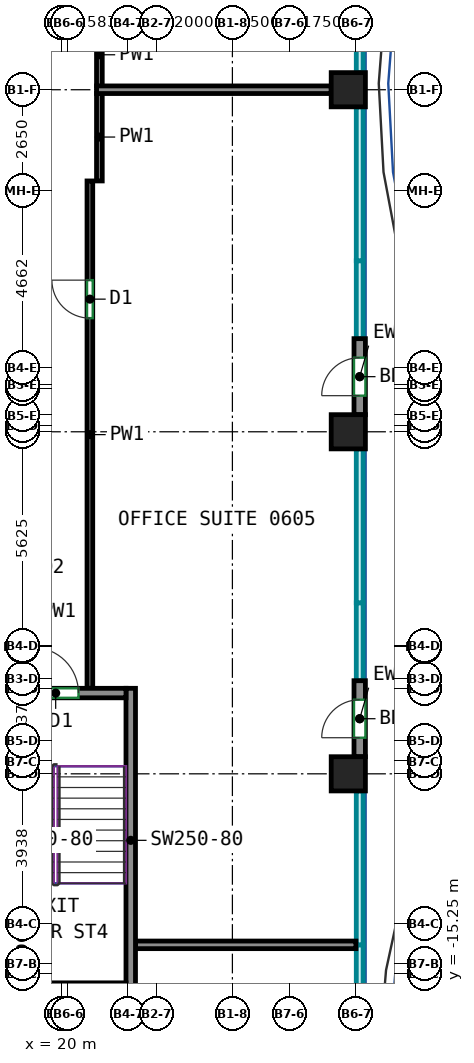
"""IFC4 building model, lengths in metres.
Left out: names, types, materials, properties, quantities, classifications, styles, units other than length and angle.
Written with IfcOpenShell. Run it as: python <this file> out.ifc"""

import sys

from ifc_helpers import new_model, si_unit, direction, frame, frame_2d, origin, origin_2d, place, context, subcontext, project, spatial, rectangle, extrude, source, transform, mapped, element, fill, save


model = new_model("IFC4")
c1 = context("Model", 3, precision=1e-05, world=origin(), true_north=direction((0.0, 1.0)))
c2 = subcontext(c1, "Body", "Model", "MODEL_VIEW")
j1 = project(units=[si_unit("LENGTHUNIT", "METRE"), si_unit("PLANEANGLEUNIT", "RADIAN")], contexts=[c1])
p1 = place(None, origin())
s1 = spatial("IfcSite", under=j1, at=p1, CompositionType="ELEMENT")
p2 = place(p1, origin())
s2 = spatial("IfcBuilding", under=s1, at=p2, CompositionType="ELEMENT")
p3 = place(p2, frame((0.0, 0.0, 31.0)))
s3 = spatial("IfcBuildingStorey", under=s2, at=p3, CompositionType="ELEMENT", Elevation=31.0)
m1 = source(origin(), c2, "Body", "SweptSolid", [
    extrude(rectangle(XDim=0.9, YDim=0.9, at=origin_2d()), origin(), (0.0, 0.0, 1.0), 3.72),
])
for number, where, z_axis, x_axis in (
    (1, (27.55, -10.0, 0.0), (0.0, 0.0, 1.0), (1.0, 0.0, 0.0)),
    (2, (27.55, -1.0, 0.0), (0.0, 0.0, 1.0), (1.0, 0.0, 0.0)),
    (3, (27.55, 8.0, 0.0), (0.0, 0.0, 1.0), (1.0, 0.0, 0.0)),
):
    element("IfcColumn", number, at=place(p3, frame(where, z_axis=z_axis, x_axis=x_axis)), inside=s3, PredefinedType="COLUMN", context=c2, shape_type="MappedRepresentation", body=[
        mapped(m1, transform((0.0, 0.0, 0.0))),
    ])
m2 = source(origin(), c2, "Body", "SweptSolid", [
    extrude(rectangle(XDim=8.0, YDim=0.25, at=frame_2d((4.0, 0.0))), origin(), (0.0, 0.0, 1.0), 3.72),
])
p4 = place(p3, frame((21.825, -15.75, 0.0), z_axis=(0.0, 0.0, 1.0), x_axis=(0.0, 1.0, 0.0)))
e4 = element("IfcWall", 4, at=p4, inside=s3, PredefinedType="SHEAR", context=c2, shape_type="MappedRepresentation", body=[
    mapped(m2, transform((0.0, 0.0, 0.0))),
])
m3 = source(origin(), c2, "Body", "SweptSolid", [
    extrude(rectangle(XDim=3.7, YDim=0.25, at=frame_2d((1.85, 0.0))), origin(), (0.0, 0.0, 1.0), 3.72),
])
p5 = place(p3, frame((18.0, -7.875, 0.0), z_axis=(0.0, 0.0, 1.0), x_axis=(1.0, 0.0, 0.0)))
e5 = element("IfcWall", 5, at=p5, inside=s3, PredefinedType="SHEAR", context=c2, shape_type="MappedRepresentation", body=[
    mapped(m3, transform((0.0, 0.0, 0.0))),
])
p6 = place(p5, frame((1.25, 0.0, 0.0)))
e6 = element("IfcOpeningElement", 6, at=p6, cuts=e5, PredefinedType="OPENING", context=c2, shape_type="SweptSolid", body=[
    extrude(rectangle(XDim=1.2, YDim=2.1, at=frame_2d((0.6, 1.05))), frame((0.0, 0.135, 0.0), z_axis=(0.0, -1.0, 0.0), x_axis=(1.0, 0.0, 0.0)), (0.0, 0.0, 1.0), 0.27),
])
m4 = source(origin(), c2, "Body", "SweptSolid", [
    extrude(rectangle(XDim=2.0, YDim=0.3, at=frame_2d((1.0, 0.0))), origin(), (0.0, 0.0, 1.0), 3.72),
])
p7 = place(p3, frame((27.85, -9.55, 0.0), z_axis=(0.0, 0.0, 1.0), x_axis=(0.0, 1.0, 0.0)))
e7 = element("IfcWall", 7, at=p7, inside=s3, PredefinedType="SOLIDWALL", context=c2, shape_type="MappedRepresentation", body=[
    mapped(m4, transform((0.0, 0.0, 0.0))),
])
p8 = place(p7, frame((0.5, 0.0, 0.0)))
e8 = element("IfcOpeningElement", 8, at=p8, cuts=e7, PredefinedType="OPENING", context=c2, shape_type="SweptSolid", body=[
    extrude(rectangle(XDim=1.0, YDim=2.1, at=frame_2d((0.5, 1.05))), frame((0.0, 0.16, 0.0), z_axis=(0.0, -1.0, 0.0), x_axis=(1.0, 0.0, 0.0)), (0.0, 0.0, 1.0), 0.32),
])
p9 = place(p3, frame((27.85, -0.55, 0.0), z_axis=(0.0, 0.0, 1.0), x_axis=(0.0, 1.0, 0.0)))
e9 = element("IfcWall", 9, at=p9, inside=s3, PredefinedType="SOLIDWALL", context=c2, shape_type="MappedRepresentation", body=[
    mapped(m4, transform((0.0, 0.0, 0.0))),
])
p10 = place(p9, frame((0.5, 0.0, 0.0)))
e10 = element("IfcOpeningElement", 10, at=p10, cuts=e9, PredefinedType="OPENING", context=c2, shape_type="SweptSolid", body=[
    extrude(rectangle(XDim=1.0, YDim=2.1, at=frame_2d((0.5, 1.05))), frame((0.0, 0.16, 0.0), z_axis=(0.0, -1.0, 0.0), x_axis=(1.0, 0.0, 0.0)), (0.0, 0.0, 1.0), 0.32),
])
p11 = place(p3, frame((21.0, 5.6, 0.0), z_axis=(0.0, 0.0, 1.0), x_axis=(0.0, 1.0, 0.0)))
e11 = element("IfcWall", 11, at=p11, inside=s3, PredefinedType="PARTITIONING", context=c2, shape_type="SweptSolid", body=[
    extrude(rectangle(XDim=2.31, YDim=0.15, at=frame_2d((1.155, 0.0))), origin(), (0.0, 0.0, 1.0), 3.72),
])
p12 = place(p3, frame((20.75, -7.75, 0.0), z_axis=(0.0, 0.0, 1.0), x_axis=(0.0, 1.0, 0.0)))
e12 = element("IfcWall", 12, at=p12, inside=s3, PredefinedType="PARTITIONING", context=c2, shape_type="SweptSolid", body=[
    extrude(rectangle(XDim=13.35, YDim=0.15, at=frame_2d((6.675, 0.0))), origin(), (0.0, 0.0, 1.0), 3.72),
])
p13 = place(p12, frame((9.74, 0.0, 0.0)))
e13 = element("IfcOpeningElement", 13, at=p13, cuts=e12, PredefinedType="OPENING", context=c2, shape_type="SweptSolid", body=[
    extrude(rectangle(XDim=1.0, YDim=2.1, at=frame_2d((0.5, 1.05))), frame((0.0, 0.085, 0.0), z_axis=(0.0, -1.0, 0.0), x_axis=(1.0, 0.0, 0.0)), (0.0, 0.0, 1.0), 0.17),
])
p14 = place(p3, frame((21.0, 8.09, 0.0), z_axis=(0.0, 0.0, 1.0), x_axis=(0.0, 1.0, 0.0)))
e14 = element("IfcWall", 14, at=p14, inside=s3, PredefinedType="PARTITIONING", context=c2, shape_type="SweptSolid", body=[
    extrude(rectangle(XDim=1.66, YDim=0.15, at=frame_2d((0.83, 0.0))), origin(), (0.0, 0.0, 1.0), 3.72),
])
p15 = place(p3, frame((21.95, -14.5, 0.0), z_axis=(0.0, 0.0, 1.0), x_axis=(1.0, 0.0, 0.0)))
e15 = element("IfcWall", 15, at=p15, inside=s3, PredefinedType="PARTITIONING", context=c2, shape_type="SweptSolid", body=[
    extrude(rectangle(XDim=5.8, YDim=0.2, at=frame_2d((2.9, 0.0))), origin(), (0.0, 0.0, 1.0), 3.72),
])
p16 = place(p3, frame((20.926, 8.0, 0.0), z_axis=(0.0, 0.0, 1.0), x_axis=(1.0, 0.0, 0.0)))
e16 = element("IfcWall", 16, at=p16, inside=s3, PredefinedType="PARTITIONING", context=c2, shape_type="SweptSolid", body=[
    extrude(rectangle(XDim=6.174, YDim=0.2, at=frame_2d((3.087, 0.0))), origin(), (0.0, 0.0, 1.0), 3.72),
])
p17 = place(p8, origin())
e17 = element("IfcDoor", 17, at=p17, inside=s3, OperationType="SINGLE_SWING_LEFT", PredefinedType="DOOR", context=c2, shape_type="SweptSolid", body=[
    extrude(rectangle(XDim=1.0, YDim=2.1, at=frame_2d((0.5, 1.05))), frame((0.0, 0.025, 0.0), z_axis=(0.0, -1.0, 0.0), x_axis=(1.0, 0.0, 0.0)), (0.0, 0.0, 1.0), 0.05),
])
fill(e8, e17)
p18 = place(p10, origin())
e18 = element("IfcDoor", 18, at=p18, inside=s3, OperationType="SINGLE_SWING_LEFT", PredefinedType="DOOR", context=c2, shape_type="SweptSolid", body=[
    extrude(rectangle(XDim=1.0, YDim=2.1, at=frame_2d((0.5, 1.05))), frame((0.0, 0.025, 0.0), z_axis=(0.0, -1.0, 0.0), x_axis=(1.0, 0.0, 0.0)), (0.0, 0.0, 1.0), 0.05),
])
fill(e10, e18)
p19 = place(p6, origin())
e19 = element("IfcDoor", 19, at=p19, inside=s3, OperationType="DOUBLE_DOOR_SINGLE_SWING", PredefinedType="DOOR", context=c2, shape_type="SweptSolid", body=[
    extrude(rectangle(XDim=1.2, YDim=2.1, at=frame_2d((0.6, 1.05))), frame((0.0, 0.025, 0.0), z_axis=(0.0, -1.0, 0.0), x_axis=(1.0, 0.0, 0.0)), (0.0, 0.0, 1.0), 0.05),
])
fill(e6, e19)
p20 = place(p13, origin())
e20 = element("IfcDoor", 20, at=p20, inside=s3, OperationType="SINGLE_SWING_RIGHT", PredefinedType="DOOR", context=c2, shape_type="SweptSolid", body=[
    extrude(rectangle(XDim=1.0, YDim=2.1, at=frame_2d((0.5, 1.05))), frame((0.0, 0.025, 0.0), z_axis=(0.0, -1.0, 0.0), x_axis=(1.0, 0.0, 0.0)), (0.0, 0.0, 1.0), 0.05),
])
fill(e13, e20)
save(model, sys.argv[1])
